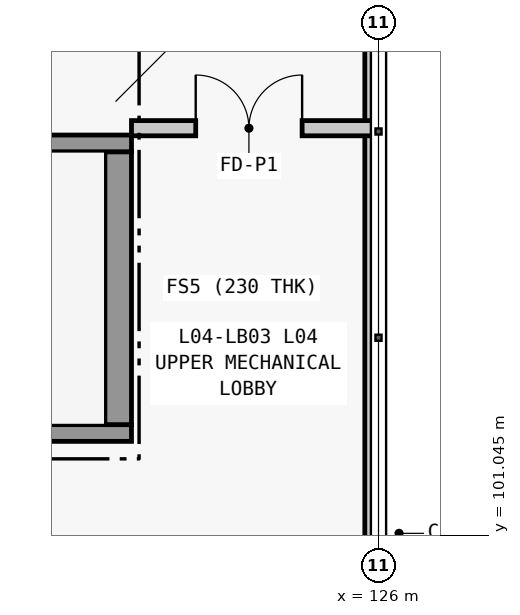
"""IFC4 building model, lengths in metres.
Left out: names, types, materials, properties, quantities, classifications, styles, units other than length and angle.
Written with IfcOpenShell. Run it as: python <this file> out.ifc"""

import sys

from ifc_helpers import new_model, si_unit, direction, frame, frame_2d, origin, place, context, subcontext, project, spatial, rectangle, extrude, element, fill, save


model = new_model("IFC4")
c1 = context("Model", 3, precision=1e-05, world=origin(), true_north=direction((0.0, 1.0)))
c2 = subcontext(c1, "Body", "Model", "MODEL_VIEW")
j1 = project(units=[si_unit("LENGTHUNIT", "METRE"), si_unit("PLANEANGLEUNIT", "RADIAN")], contexts=[c1])
p1 = place(None, origin())
s1 = spatial("IfcSite", under=j1, at=p1, CompositionType="ELEMENT")
p2 = place(p1, origin())
s2 = spatial("IfcBuilding", under=s1, at=p2, CompositionType="ELEMENT")
p3 = place(p2, frame((0.0, 0.0, 17.4)))
s3 = spatial("IfcBuildingStorey", under=s2, at=p3, CompositionType="ELEMENT", Elevation=17.4)
p4 = place(p3, frame((125.91, 92.4, 4.2), z_axis=(0.0, 0.0, 1.0), x_axis=(0.0, 1.0, 0.0)))
e1 = element("IfcWall", 1, at=p4, inside=s3, PredefinedType="PARAPET", context=c2, shape_type="SweptSolid", body=[
    extrude(rectangle(XDim=25.2, YDim=0.18, at=frame_2d((12.6, 0.0))), origin(), (0.0, 0.0, 1.0), 0.95),
])
p5 = place(p3, frame((113.98, 102.39, 0.0), z_axis=(0.0, 0.0, 1.0), x_axis=(1.0, 0.0, 0.0)))
e2 = element("IfcWall", 2, at=p5, inside=s3, PredefinedType="SOLIDWALL", context=c2, shape_type="SweptSolid", body=[
    extrude(rectangle(XDim=8.77, YDim=0.22, at=frame_2d((4.385, 0.0))), origin(), (0.0, 0.0, 1.0), 3.98),
])
p6 = place(p3, frame((122.575, 102.5, 0.0), z_axis=(0.0, 0.0, 1.0), x_axis=(0.0, 1.0, 0.0)))
e3 = element("IfcWall", 3, at=p6, inside=s3, PredefinedType="SHEAR", context=c2, shape_type="SweptSolid", body=[
    extrude(rectangle(XDim=3.59, YDim=0.35, at=frame_2d((1.795, 0.0))), origin(), (0.0, 0.0, 1.0), 3.98),
])
p7 = place(p3, frame((122.75, 106.2, 0.0), z_axis=(0.0, 0.0, 1.0), x_axis=(-1.0, 0.0, 0.0)))
e4 = element("IfcWall", 4, at=p7, inside=s3, PredefinedType="SOLIDWALL", context=c2, shape_type="SweptSolid", body=[
    extrude(rectangle(XDim=8.77, YDim=0.22, at=frame_2d((4.385, 0.0))), origin(), (0.0, 0.0, 1.0), 3.98),
])
p8 = place(p3, frame((122.75, 106.4, 0.0), z_axis=(0.0, 0.0, 1.0), x_axis=(1.0, 0.0, 0.0)))
e5 = element("IfcWall", 5, at=p8, inside=s3, PredefinedType="PARTITIONING", context=c2, shape_type="SweptSolid", body=[
    extrude(rectangle(XDim=3.23, YDim=0.2, at=frame_2d((1.615, 0.0))), origin(), (0.0, 0.0, 1.0), 3.98),
])
p9 = place(p8, frame((0.845, 0.0, 0.0)))
e6 = element("IfcOpeningElement", 6, at=p9, cuts=e5, PredefinedType="OPENING", context=c2, shape_type="SweptSolid", body=[
    extrude(rectangle(XDim=1.4, YDim=2.2, at=frame_2d((0.7, 1.1))), frame((0.0, 0.115, 0.0), z_axis=(0.0, -1.0, 0.0), x_axis=(1.0, 0.0, 0.0)), (0.0, 0.0, 1.0), 0.23),
])
p10 = place(p9, origin())
e7 = element("IfcDoor", 7, at=p10, inside=s3, OperationType="DOUBLE_DOOR_SINGLE_SWING", PredefinedType="DOOR", context=c2, shape_type="SweptSolid", body=[
    extrude(rectangle(XDim=1.4, YDim=2.2, at=frame_2d((0.7, 1.1))), frame((0.0, 0.025, 0.0), z_axis=(0.0, -1.0, 0.0), x_axis=(1.0, 0.0, 0.0)), (0.0, 0.0, 1.0), 0.05),
])
fill(e6, e7)
save(model, sys.argv[1])
